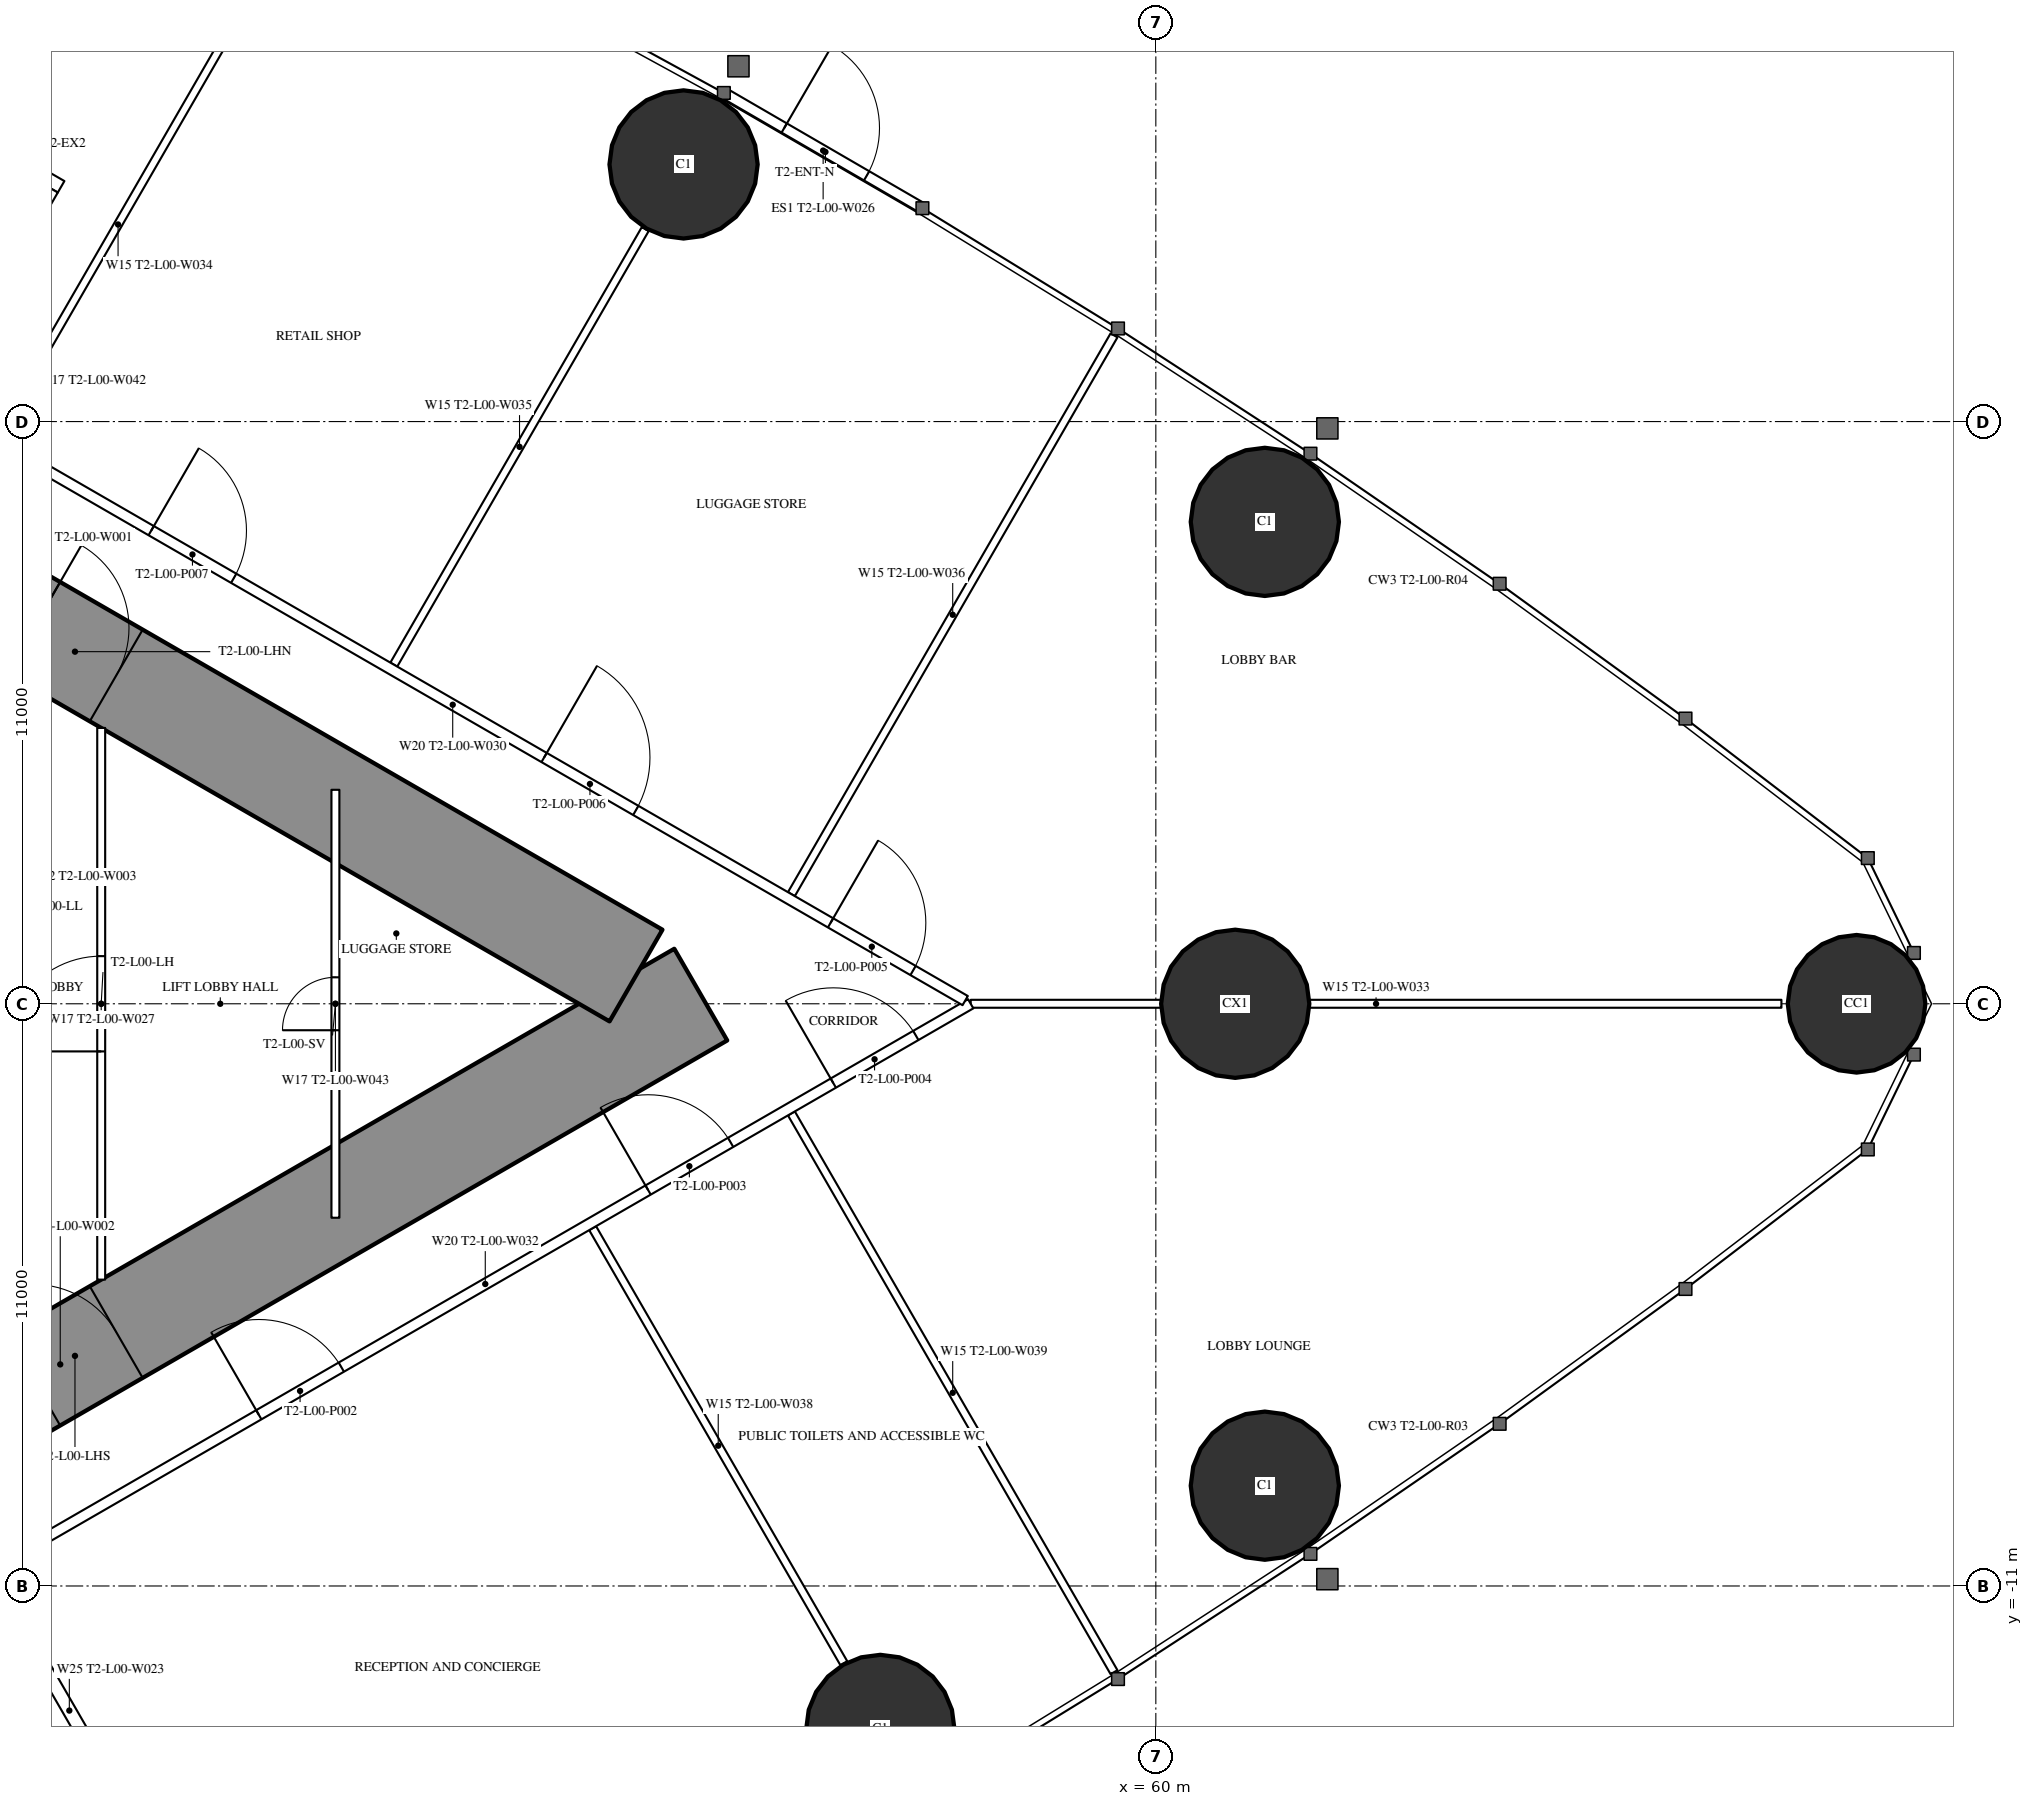
"""IFC4 building model, lengths in metres.
Left out: names, types, materials, properties, quantities, classifications, styles, units other than length and angle.
Written with IfcOpenShell. Run it as: python <this file> out.ifc"""

import sys

from ifc_helpers import new_model, si_unit, direction, frame, frame_2d, origin, origin_2d, place, context, subcontext, project, spatial, rectangle, hollow_circle, extrude, element, fill, save


model = new_model("IFC4")
c1 = context("Model", 3, precision=1e-05, world=origin(), true_north=direction((0.0, 1.0)))
c2 = subcontext(c1, "Body", "Model", "MODEL_VIEW")
j1 = project(units=[si_unit("LENGTHUNIT", "METRE"), si_unit("PLANEANGLEUNIT", "RADIAN")], contexts=[c1])
p1 = place(None, origin())
s1 = spatial("IfcSite", under=j1, at=p1, CompositionType="ELEMENT")
p2 = place(p1, origin())
s2 = spatial("IfcBuilding", under=s1, at=p2, CompositionType="ELEMENT")
p3 = place(p2, origin())
s3 = spatial("IfcBuildingStorey", under=s2, at=p3, CompositionType="ELEMENT", Elevation=0.0)
p4 = place(p3, frame((73.239, 0.0, 0.0), z_axis=(0.0, 0.0, 1.0), x_axis=(1.0, 0.0, 0.0)))
e1 = element("IfcColumn", 1, at=p4, inside=s3, PredefinedType="COLUMN", context=c2, shape_type="SweptSolid", body=[
    extrude(hollow_circle(Radius=1.3, WallThickness=0.1, at=origin_2d()), origin(), (0.0, 0.0, 1.0), 7.2),
])
for number, where, z_axis, x_axis in (
    (2, (62.059, 9.105, 0.0), (0.0, 0.0, 1.0), (1.0, 0.0, 0.0)),
    (3, (51.078, 15.858, 0.0), (0.0, 0.0, 1.0), (1.0, 0.0, 0.0)),
    (4, (54.795, -13.701, 0.0), (0.0, 0.0, 1.0), (1.0, 0.0, 0.0)),
    (5, (62.059, -9.105, 0.0), (0.0, 0.0, 1.0), (1.0, 0.0, 0.0)),
):
    element("IfcColumn", number, at=place(p3, frame(where, z_axis=z_axis, x_axis=x_axis)), inside=s3, PredefinedType="COLUMN", context=c2, shape_type="SweptSolid", body=[
        extrude(hollow_circle(Radius=1.4, WallThickness=0.12, at=origin_2d()), origin(), (0.0, 0.0, 1.0), 7.2),
    ])
p5 = place(p3, frame((61.5, 0.0, 0.0), z_axis=(0.0, 0.0, 1.0), x_axis=(1.0, 0.0, 0.0)))
e6 = element("IfcColumn", 6, at=p5, inside=s3, PredefinedType="COLUMN", context=c2, shape_type="SweptSolid", body=[
    extrude(hollow_circle(Radius=1.4, WallThickness=0.1, at=origin_2d()), origin(), (0.0, 0.0, 1.0), 7.2),
])
p6 = place(p3, frame((27.2, -13.8, 0.0), z_axis=(0.0, 0.0, 1.0), x_axis=(0.866027159892, 0.499996958321, 0.0)))
e7 = element("IfcWall", 7, at=p6, inside=s3, PredefinedType="SHEAR", context=c2, shape_type="SweptSolid", body=[
    extrude(rectangle(XDim=27.947, YDim=2.0, at=frame_2d((13.973, 0.0))), origin(), (0.0, 0.0, 1.0), 7.2),
])
p7 = place(p6, frame((4.6, 0.0, 0.0)))
e8 = element("IfcOpeningElement", 8, at=p7, cuts=e7, PredefinedType="OPENING", context=c2, shape_type="SweptSolid", body=[
    extrude(rectangle(XDim=1.0, YDim=2.2, at=frame_2d((0.5, 1.1))), frame((0.0, 1.01, 0.0), z_axis=(0.0, -1.0, 0.0), x_axis=(1.0, 0.0, 0.0)), (0.0, 0.0, 1.0), 2.02),
])
p8 = place(p6, frame((13.395, 0.0, 0.0)))
e9 = element("IfcOpeningElement", 9, at=p8, cuts=e7, PredefinedType="OPENING", context=c2, shape_type="SweptSolid", body=[
    extrude(rectangle(XDim=1.8, YDim=2.2, at=frame_2d((0.9, 1.1))), frame((0.0, 1.01, 0.0), z_axis=(0.0, -1.0, 0.0), x_axis=(1.0, 0.0, 0.0)), (0.0, 0.0, 1.0), 2.02),
])
p9 = place(p3, frame((27.2, 13.8, 0.0), z_axis=(0.0, 0.0, 1.0), x_axis=(0.866024545924, -0.500001485854, 0.0)))
e10 = element("IfcWall", 10, at=p9, inside=s3, PredefinedType="SHEAR", context=c2, shape_type="SweptSolid", body=[
    extrude(rectangle(XDim=26.534, YDim=2.0, at=frame_2d((13.267, 0.0))), origin(), (0.0, 0.0, 1.0), 7.2),
])
p10 = place(p9, frame((4.6, 0.0, 0.0)))
e11 = element("IfcOpeningElement", 11, at=p10, cuts=e10, PredefinedType="OPENING", context=c2, shape_type="SweptSolid", body=[
    extrude(rectangle(XDim=1.0, YDim=2.2, at=frame_2d((0.5, 1.1))), frame((0.0, 1.01, 0.0), z_axis=(0.0, -1.0, 0.0), x_axis=(1.0, 0.0, 0.0)), (0.0, 0.0, 1.0), 2.02),
])
p11 = place(p9, frame((13.395, 0.0, 0.0)))
e12 = element("IfcOpeningElement", 12, at=p11, cuts=e10, PredefinedType="OPENING", context=c2, shape_type="SweptSolid", body=[
    extrude(rectangle(XDim=1.8, YDim=2.2, at=frame_2d((0.9, 1.1))), frame((0.0, 1.01, 0.0), z_axis=(0.0, -1.0, 0.0), x_axis=(1.0, 0.0, 0.0)), (0.0, 0.0, 1.0), 2.02),
])
p12 = place(p3, frame((51.839, 17.209, 0.0), z_axis=(0.0, 0.0, 1.0), x_axis=(0.864866989785, -0.502001085637, 0.0)))
e13 = element("IfcWall", 13, at=p12, inside=s3, PredefinedType="STANDARD", context=c2, shape_type="SweptSolid", body=[
    extrude(rectangle(XDim=4.338, YDim=0.2, at=frame_2d((2.169, 0.0))), origin(), (0.0, 0.0, 1.0), 6.85),
])
p13 = place(p12, frame((1.319, 0.0, 0.0)))
e14 = element("IfcOpeningElement", 14, at=p13, cuts=e13, PredefinedType="OPENING", context=c2, shape_type="SweptSolid", body=[
    extrude(rectangle(XDim=1.8, YDim=2.4, at=frame_2d((0.9, 1.2))), frame((0.0, 0.11, 0.0), z_axis=(0.0, -1.0, 0.0), x_axis=(1.0, 0.0, 0.0)), (0.0, 0.0, 1.0), 0.22),
])
p14 = place(p3, frame((49.36, -4.239, 0.0), z_axis=(0.0, 0.0, 1.0), x_axis=(0.499984446848, -0.866034383215, 0.0)))
e15 = element("IfcWall", 15, at=p14, inside=s3, PredefinedType="PARTITIONING", context=c2, shape_type="SweptSolid", body=[
    extrude(rectangle(XDim=9.491, YDim=0.15, at=frame_2d((4.746, 0.0))), origin(), (0.0, 0.0, 1.0), 5.85),
])
p15 = place(p3, frame((53.115, -2.071, 0.0), z_axis=(0.0, 0.0, 1.0), x_axis=(0.500000975677, -0.866024840476, 0.0)))
e16 = element("IfcWall", 16, at=p15, inside=s3, PredefinedType="PARTITIONING", context=c2, shape_type="SweptSolid", body=[
    extrude(rectangle(XDim=12.191, YDim=0.15, at=frame_2d((6.095, 0.0))), origin(), (0.0, 0.0, 1.0), 6.85),
])
p16 = place(p3, frame((38.095, 10.743, 0.0), z_axis=(0.0, 0.0, 1.0), x_axis=(0.499989105942, 0.866031693381, 0.0)))
e17 = element("IfcWall", 17, at=p16, inside=s3, PredefinedType="PARTITIONING", context=c2, shape_type="SweptSolid", body=[
    extrude(rectangle(XDim=9.194, YDim=0.15, at=frame_2d((4.597, 0.0))), origin(), (0.0, 0.0, 1.0), 5.85),
])
p17 = place(p3, frame((45.603, 6.408, 0.0), z_axis=(0.0, 0.0, 1.0), x_axis=(0.499999740363, 0.866025553686, 0.0)))
e18 = element("IfcWall", 18, at=p17, inside=s3, PredefinedType="PARTITIONING", context=c2, shape_type="SweptSolid", body=[
    extrude(rectangle(XDim=9.501, YDim=0.15, at=frame_2d((4.751, 0.0))), origin(), (0.0, 0.0, 1.0), 5.85),
])
p18 = place(p3, frame((53.115, 2.071, 0.0), z_axis=(0.0, 0.0, 1.0), x_axis=(0.500000975677, 0.866024840476, 0.0)))
e19 = element("IfcWall", 19, at=p18, inside=s3, PredefinedType="PARTITIONING", context=c2, shape_type="SweptSolid", body=[
    extrude(rectangle(XDim=12.191, YDim=0.15, at=frame_2d((6.095, 0.0))), origin(), (0.0, 0.0, 1.0), 6.85),
])
p19 = place(p3, frame((56.502, 0.0, 0.0), z_axis=(0.0, 0.0, 1.0), x_axis=(1.0, 0.0, 0.0)))
e20 = element("IfcWall", 20, at=p19, inside=s3, PredefinedType="PARTITIONING", context=c2, shape_type="SweptSolid", body=[
    extrude(rectangle(XDim=15.317, YDim=0.15, at=frame_2d((7.658, 0.0))), origin(), (0.0, 0.0, 1.0), 5.85),
])
p20 = place(p3, frame((38.16, -10.59, 0.0), z_axis=(0.0, 0.0, 1.0), x_axis=(0.866027029586, 0.499997184019, 0.0)))
e21 = element("IfcWall", 21, at=p20, inside=s3, PredefinedType="PARTITIONING", context=c2, shape_type="SweptSolid", body=[
    extrude(rectangle(XDim=21.18, YDim=0.2, at=frame_2d((10.59, 0.0))), origin(), (0.0, 0.0, 1.0), 6.85),
])
p21 = place(p20, frame((14.142, 0.0, 0.0)))
e22 = element("IfcOpeningElement", 22, at=p21, cuts=e21, PredefinedType="OPENING", context=c2, shape_type="SweptSolid", body=[
    extrude(rectangle(XDim=1.8, YDim=2.2, at=frame_2d((0.9, 1.1))), frame((0.0, 0.11, 0.0), z_axis=(0.0, -1.0, 0.0), x_axis=(1.0, 0.0, 0.0)), (0.0, 0.0, 1.0), 0.22),
])
p22 = place(p20, frame((18.183, 0.0, 0.0)))
e23 = element("IfcOpeningElement", 23, at=p22, cuts=e21, PredefinedType="OPENING", context=c2, shape_type="SweptSolid", body=[
    extrude(rectangle(XDim=1.8, YDim=2.2, at=frame_2d((0.9, 1.1))), frame((0.0, 0.11, 0.0), z_axis=(0.0, -1.0, 0.0), x_axis=(1.0, 0.0, 0.0)), (0.0, 0.0, 1.0), 0.22),
])
p23 = place(p20, frame((5.65, 0.0, 0.0)))
e24 = element("IfcOpeningElement", 24, at=p23, cuts=e21, PredefinedType="OPENING", context=c2, shape_type="SweptSolid", body=[
    extrude(rectangle(XDim=1.8, YDim=2.2, at=frame_2d((0.9, 1.1))), frame((0.0, 0.11, 0.0), z_axis=(0.0, -1.0, 0.0), x_axis=(1.0, 0.0, 0.0)), (0.0, 0.0, 1.0), 0.22),
])
p24 = place(p3, frame((37.034, 11.24, 0.0), z_axis=(0.0, 0.0, 1.0), x_axis=(0.866025942536, -0.499999066854, 0.0)))
e25 = element("IfcWall", 25, at=p24, inside=s3, PredefinedType="PARTITIONING", context=c2, shape_type="SweptSolid", body=[
    extrude(rectangle(XDim=22.36, YDim=0.2, at=frame_2d((11.18, 0.0))), origin(), (0.0, 0.0, 1.0), 6.85),
])
p25 = place(p24, frame((19.423, 0.0, 0.0)))
e26 = element("IfcOpeningElement", 26, at=p25, cuts=e25, PredefinedType="OPENING", context=c2, shape_type="SweptSolid", body=[
    extrude(rectangle(XDim=1.8, YDim=2.2, at=frame_2d((0.9, 1.1))), frame((0.0, 0.11, 0.0), z_axis=(0.0, -1.0, 0.0), x_axis=(1.0, 0.0, 0.0)), (0.0, 0.0, 1.0), 0.22),
])
p26 = place(p24, frame((13.174, 0.0, 0.0)))
e27 = element("IfcOpeningElement", 27, at=p26, cuts=e25, PredefinedType="OPENING", context=c2, shape_type="SweptSolid", body=[
    extrude(rectangle(XDim=2.0, YDim=2.4, at=frame_2d((1.0, 1.2))), frame((0.0, 0.11, 0.0), z_axis=(0.0, -1.0, 0.0), x_axis=(1.0, 0.0, 0.0)), (0.0, 0.0, 1.0), 0.22),
])
p27 = place(p24, frame((4.602, 0.0, 0.0)))
e28 = element("IfcOpeningElement", 28, at=p27, cuts=e25, PredefinedType="OPENING", context=c2, shape_type="SweptSolid", body=[
    extrude(rectangle(XDim=1.8, YDim=2.2, at=frame_2d((0.9, 1.1))), frame((0.0, 0.11, 0.0), z_axis=(0.0, -1.0, 0.0), x_axis=(1.0, 0.0, 0.0)), (0.0, 0.0, 1.0), 0.22),
])
p28 = place(p3, frame((40.075, -5.212, 0.0), z_axis=(0.0, 0.0, 1.0), x_axis=(0.0, 1.0, 0.0)))
e29 = element("IfcWall", 29, at=p28, inside=s3, PredefinedType="PARTITIONING", context=c2, shape_type="SweptSolid", body=[
    extrude(rectangle(XDim=10.424, YDim=0.15, at=frame_2d((5.212, 0.0))), origin(), (0.0, 0.0, 1.0), 6.85),
])
p29 = place(p28, frame((4.312, 0.0, 0.0)))
e30 = element("IfcOpeningElement", 30, at=p29, cuts=e29, PredefinedType="OPENING", context=c2, shape_type="SweptSolid", body=[
    extrude(rectangle(XDim=1.8, YDim=2.2, at=frame_2d((0.9, 1.1))), frame((0.0, 0.085, 0.0), z_axis=(0.0, -1.0, 0.0), x_axis=(1.0, 0.0, 0.0)), (0.0, 0.0, 1.0), 0.17),
])
p30 = place(p3, frame((44.5, -4.043, 0.0), z_axis=(0.0, 0.0, 1.0), x_axis=(0.0, 1.0, 0.0)))
e31 = element("IfcWall", 31, at=p30, inside=s3, PredefinedType="PARTITIONING", context=c2, shape_type="SweptSolid", body=[
    extrude(rectangle(XDim=8.085, YDim=0.15, at=frame_2d((4.043, 0.0))), origin(), (0.0, 0.0, 1.0), 5.45),
])
p31 = place(p30, frame((3.543, 0.0, 0.0)))
e32 = element("IfcOpeningElement", 32, at=p31, cuts=e31, PredefinedType="OPENING", context=c2, shape_type="SweptSolid", body=[
    extrude(rectangle(XDim=1.0, YDim=2.2, at=frame_2d((0.5, 1.1))), frame((0.0, 0.085, 0.0), z_axis=(0.0, -1.0, 0.0), x_axis=(1.0, 0.0, 0.0)), (0.0, 0.0, 1.0), 0.17),
])
p32 = place(p3, frame((38.673, -11.968, 0.0), z_axis=(0.0, 0.0, 1.0), x_axis=(0.499929347863, -0.866066190972, 0.0)))
e33 = element("IfcWall", 33, at=p32, inside=s3, PredefinedType="PARTITIONING", context=c2, shape_type="SweptSolid", body=[
    extrude(rectangle(XDim=3.201, YDim=0.25, at=frame_2d((1.6, 0.0))), origin(), (0.0, 0.0, 1.0), 6.85),
])
p33 = place(p3, frame((35.333, 17.736, 0.0), z_axis=(0.0, 0.0, 1.0), x_axis=(0.866043305498, -0.49996899204, 0.0)))
e34 = element("IfcWall", 34, at=p33, inside=s3, PredefinedType="PARTITIONING", context=c2, shape_type="SweptSolid", body=[
    extrude(rectangle(XDim=4.6, YDim=0.25, at=frame_2d((2.3, 0.0))), origin(), (0.0, 0.0, 1.0), 6.85),
])
p34 = place(p3, frame((37.547, 12.618, 0.0), z_axis=(0.0, 0.0, 1.0), x_axis=(0.499929347863, 0.866066190972, 0.0)))
e35 = element("IfcWall", 35, at=p34, inside=s3, PredefinedType="PARTITIONING", context=c2, shape_type="SweptSolid", body=[
    extrude(rectangle(XDim=3.201, YDim=0.25, at=frame_2d((1.6, 0.0))), origin(), (0.0, 0.0, 1.0), 6.85),
])
p35 = place(p13, origin())
e36 = element("IfcDoor", 36, at=p35, inside=s3, OperationType="SINGLE_SWING_LEFT", PredefinedType="DOOR", context=c2, shape_type="SweptSolid", body=[
    extrude(rectangle(XDim=1.8, YDim=2.4, at=frame_2d((0.9, 1.2))), frame((0.0, 0.025, 0.0), z_axis=(0.0, -1.0, 0.0), x_axis=(1.0, 0.0, 0.0)), (0.0, 0.0, 1.0), 0.05),
])
fill(e14, e36)
p36 = place(p21, origin())
e37 = element("IfcDoor", 37, at=p36, inside=s3, OperationType="DOUBLE_DOOR_SINGLE_SWING", PredefinedType="DOOR", context=c2, shape_type="SweptSolid", body=[
    extrude(rectangle(XDim=1.8, YDim=2.2, at=frame_2d((0.9, 1.1))), frame((0.0, 0.025, 0.0), z_axis=(0.0, -1.0, 0.0), x_axis=(1.0, 0.0, 0.0)), (0.0, 0.0, 1.0), 0.05),
])
fill(e22, e37)
p37 = place(p22, origin())
e38 = element("IfcDoor", 38, at=p37, inside=s3, OperationType="DOUBLE_DOOR_SINGLE_SWING", PredefinedType="DOOR", context=c2, shape_type="SweptSolid", body=[
    extrude(rectangle(XDim=1.8, YDim=2.2, at=frame_2d((0.9, 1.1))), frame((0.0, 0.025, 0.0), z_axis=(0.0, -1.0, 0.0), x_axis=(1.0, 0.0, 0.0)), (0.0, 0.0, 1.0), 0.05),
])
fill(e23, e38)
p38 = place(p25, origin())
e39 = element("IfcDoor", 39, at=p38, inside=s3, OperationType="DOUBLE_DOOR_SINGLE_SWING", PredefinedType="DOOR", context=c2, shape_type="SweptSolid", body=[
    extrude(rectangle(XDim=1.8, YDim=2.2, at=frame_2d((0.9, 1.1))), frame((0.0, 0.025, 0.0), z_axis=(0.0, -1.0, 0.0), x_axis=(1.0, 0.0, 0.0)), (0.0, 0.0, 1.0), 0.05),
])
fill(e26, e39)
p39 = place(p26, origin())
e40 = element("IfcDoor", 40, at=p39, inside=s3, OperationType="DOUBLE_DOOR_SINGLE_SWING", PredefinedType="DOOR", context=c2, shape_type="SweptSolid", body=[
    extrude(rectangle(XDim=2.0, YDim=2.4, at=frame_2d((1.0, 1.2))), frame((0.0, 0.025, 0.0), z_axis=(0.0, -1.0, 0.0), x_axis=(1.0, 0.0, 0.0)), (0.0, 0.0, 1.0), 0.05),
])
fill(e27, e40)
p40 = place(p27, origin())
e41 = element("IfcDoor", 41, at=p40, inside=s3, OperationType="DOUBLE_DOOR_SINGLE_SWING", PredefinedType="DOOR", context=c2, shape_type="SweptSolid", body=[
    extrude(rectangle(XDim=1.8, YDim=2.2, at=frame_2d((0.9, 1.1))), frame((0.0, 0.025, 0.0), z_axis=(0.0, -1.0, 0.0), x_axis=(1.0, 0.0, 0.0)), (0.0, 0.0, 1.0), 0.05),
])
fill(e28, e41)
p41 = place(p23, origin())
e42 = element("IfcDoor", 42, at=p41, inside=s3, OperationType="DOUBLE_DOOR_SINGLE_SWING", PredefinedType="DOOR", context=c2, shape_type="SweptSolid", body=[
    extrude(rectangle(XDim=1.8, YDim=2.2, at=frame_2d((0.9, 1.1))), frame((0.0, 0.025, 0.0), z_axis=(0.0, -1.0, 0.0), x_axis=(1.0, 0.0, 0.0)), (0.0, 0.0, 1.0), 0.05),
])
fill(e24, e42)
p42 = place(p29, origin())
e43 = element("IfcDoor", 43, at=p42, inside=s3, OperationType="DOUBLE_DOOR_SINGLE_SWING", PredefinedType="DOOR", context=c2, shape_type="SweptSolid", body=[
    extrude(rectangle(XDim=1.8, YDim=2.2, at=frame_2d((0.9, 1.1))), frame((0.0, 0.025, 0.0), z_axis=(0.0, -1.0, 0.0), x_axis=(1.0, 0.0, 0.0)), (0.0, 0.0, 1.0), 0.05),
])
fill(e30, e43)
p43 = place(p31, origin())
e44 = element("IfcDoor", 44, at=p43, inside=s3, OperationType="SINGLE_SWING_LEFT", PredefinedType="DOOR", context=c2, shape_type="SweptSolid", body=[
    extrude(rectangle(XDim=1.0, YDim=2.2, at=frame_2d((0.5, 1.1))), frame((0.0, 0.025, 0.0), z_axis=(0.0, -1.0, 0.0), x_axis=(1.0, 0.0, 0.0)), (0.0, 0.0, 1.0), 0.05),
])
fill(e32, e44)
p44 = place(p8, origin())
e45 = element("IfcDoor", 45, at=p44, inside=s3, OperationType="DOUBLE_DOOR_SINGLE_SWING", PredefinedType="DOOR", context=c2, shape_type="SweptSolid", body=[
    extrude(rectangle(XDim=1.8, YDim=2.2, at=frame_2d((0.9, 1.1))), frame((0.0, 0.025, 0.0), z_axis=(0.0, -1.0, 0.0), x_axis=(1.0, 0.0, 0.0)), (0.0, 0.0, 1.0), 0.05),
])
fill(e9, e45)
p45 = place(p11, origin())
e46 = element("IfcDoor", 46, at=p45, inside=s3, OperationType="DOUBLE_DOOR_SINGLE_SWING", PredefinedType="DOOR", context=c2, shape_type="SweptSolid", body=[
    extrude(rectangle(XDim=1.8, YDim=2.2, at=frame_2d((0.9, 1.1))), frame((0.0, 0.025, 0.0), z_axis=(0.0, -1.0, 0.0), x_axis=(1.0, 0.0, 0.0)), (0.0, 0.0, 1.0), 0.05),
])
fill(e12, e46)
save(model, sys.argv[1])
